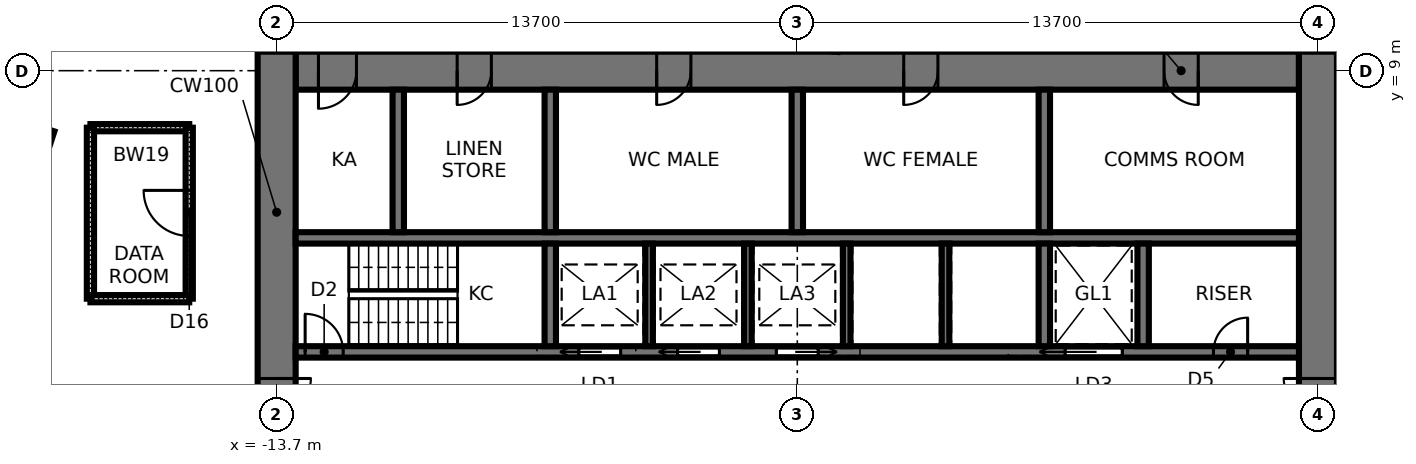
"""IFC4 building model, lengths in metres.
Left out: names, types, materials, properties, quantities, classifications, styles, units other than length and angle.
Written with IfcOpenShell. Run it as: python <this file> out.ifc"""

import sys

from ifc_helpers import new_model, si_unit, direction, frame, frame_2d, origin, origin_2d, place, context, subcontext, project, spatial, rectangle, extrude, element, fill, save


model = new_model("IFC4")
c1 = context("Model", 3, precision=1e-05, world=origin(), true_north=direction((0.0, 1.0)))
c2 = subcontext(c1, "Body", "Model", "MODEL_VIEW")
j1 = project(units=[si_unit("LENGTHUNIT", "METRE"), si_unit("PLANEANGLEUNIT", "RADIAN")], contexts=[c1])
p1 = place(None, origin())
s1 = spatial("IfcSite", under=j1, at=p1, CompositionType="ELEMENT")
p2 = place(p1, origin())
s2 = spatial("IfcBuilding", under=s1, at=p2, CompositionType="ELEMENT")
p3 = place(p2, frame((0.0, 0.0, 19.6)))
s3 = spatial("IfcBuildingStorey", under=s2, at=p3, CompositionType="ELEMENT", Elevation=19.6)
p4 = place(p3, frame((-20.808, 6.761, 0.0), z_axis=(0.0, 0.0, 1.0), x_axis=(-0.951056516295, 0.309016994375, 0.0)))
e1 = element("IfcColumn", 1, at=p4, inside=s3, PredefinedType="COLUMN", context=c2, shape_type="SweptSolid", body=[
    extrude(rectangle(XDim=2.0, YDim=2.0, at=origin_2d()), origin(), (0.0, 0.0, 1.0), 4.2),
])
p5 = place(p3, frame((13.2, 9.0, 0.0), z_axis=(0.0, 0.0, 1.0), x_axis=(-1.0, 0.0, 0.0)))
e2 = element("IfcWall", 2, at=p5, inside=s3, PredefinedType="SHEAR", context=c2, shape_type="SweptSolid", body=[
    extrude(rectangle(XDim=26.4, YDim=1.0, at=frame_2d((13.2, 0.0))), origin(), (0.0, 0.0, 1.0), 4.2),
])
p6 = place(p5, frame((2.65, 0.0, 0.0)))
e3 = element("IfcOpeningElement", 3, at=p6, cuts=e2, PredefinedType="OPENING", context=c2, shape_type="SweptSolid", body=[
    extrude(rectangle(XDim=0.9, YDim=2.1, at=frame_2d((0.45, 1.05))), frame((0.0, 0.51, 0.0), z_axis=(0.0, -1.0, 0.0), x_axis=(1.0, 0.0, 0.0)), (0.0, 0.0, 1.0), 1.02),
])
p7 = place(p5, frame((9.5, 0.0, 0.0)))
e4 = element("IfcOpeningElement", 4, at=p7, cuts=e2, PredefinedType="OPENING", context=c2, shape_type="SweptSolid", body=[
    extrude(rectangle(XDim=0.9, YDim=2.1, at=frame_2d((0.45, 1.05))), frame((0.0, 0.51, 0.0), z_axis=(0.0, -1.0, 0.0), x_axis=(1.0, 0.0, 0.0)), (0.0, 0.0, 1.0), 1.02),
])
p8 = place(p5, frame((16.0, 0.0, 0.0)))
e5 = element("IfcOpeningElement", 5, at=p8, cuts=e2, PredefinedType="OPENING", context=c2, shape_type="SweptSolid", body=[
    extrude(rectangle(XDim=0.9, YDim=2.1, at=frame_2d((0.45, 1.05))), frame((0.0, 0.51, 0.0), z_axis=(0.0, -1.0, 0.0), x_axis=(1.0, 0.0, 0.0)), (0.0, 0.0, 1.0), 1.02),
])
p9 = place(p5, frame((21.25, 0.0, 0.0)))
e6 = element("IfcOpeningElement", 6, at=p9, cuts=e2, PredefinedType="OPENING", context=c2, shape_type="SweptSolid", body=[
    extrude(rectangle(XDim=0.9, YDim=2.1, at=frame_2d((0.45, 1.05))), frame((0.0, 0.51, 0.0), z_axis=(0.0, -1.0, 0.0), x_axis=(1.0, 0.0, 0.0)), (0.0, 0.0, 1.0), 1.02),
])
p10 = place(p5, frame((24.8, 0.0, 0.0)))
e7 = element("IfcOpeningElement", 7, at=p10, cuts=e2, PredefinedType="OPENING", context=c2, shape_type="SweptSolid", body=[
    extrude(rectangle(XDim=1.0, YDim=2.1, at=frame_2d((0.5, 1.05))), frame((0.0, 0.51, 0.0), z_axis=(0.0, -1.0, 0.0), x_axis=(1.0, 0.0, 0.0)), (0.0, 0.0, 1.0), 1.02),
])
p11 = place(p3, frame((13.7, -9.5, 0.0), z_axis=(0.0, 0.0, 1.0), x_axis=(0.0, 1.0, 0.0)))
e8 = element("IfcWall", 8, at=p11, inside=s3, PredefinedType="SHEAR", context=c2, shape_type="SweptSolid", body=[
    extrude(rectangle(XDim=19.0, YDim=1.0, at=frame_2d((9.5, 0.0))), origin(), (0.0, 0.0, 1.0), 4.2),
])
p12 = place(p11, frame((8.6, 0.0, 0.0)))
e9 = element("IfcOpeningElement", 9, at=p12, cuts=e8, PredefinedType="OPENING", context=c2, shape_type="SweptSolid", body=[
    extrude(rectangle(XDim=1.8, YDim=2.4, at=frame_2d((0.9, 1.2))), frame((0.0, 0.51, 0.0), z_axis=(0.0, -1.0, 0.0), x_axis=(1.0, 0.0, 0.0)), (0.0, 0.0, 1.0), 1.02),
])
p13 = place(p3, frame((-13.7, 9.5, 0.0), z_axis=(0.0, 0.0, 1.0), x_axis=(0.0, -1.0, 0.0)))
e10 = element("IfcWall", 10, at=p13, inside=s3, PredefinedType="SHEAR", context=c2, shape_type="SweptSolid", body=[
    extrude(rectangle(XDim=19.0, YDim=1.0, at=frame_2d((9.5, 0.0))), origin(), (0.0, 0.0, 1.0), 4.2),
])
p14 = place(p13, frame((8.6, 0.0, 0.0)))
e11 = element("IfcOpeningElement", 11, at=p14, cuts=e10, PredefinedType="OPENING", context=c2, shape_type="SweptSolid", body=[
    extrude(rectangle(XDim=1.8, YDim=2.4, at=frame_2d((0.9, 1.2))), frame((0.0, 0.51, 0.0), z_axis=(0.0, -1.0, 0.0), x_axis=(1.0, 0.0, 0.0)), (0.0, 0.0, 1.0), 1.02),
])
p15 = place(p3, frame((-13.2, 1.6, 0.0), z_axis=(0.0, 0.0, 1.0), x_axis=(1.0, 0.0, 0.0)))
e12 = element("IfcWall", 12, at=p15, inside=s3, PredefinedType="SHEAR", context=c2, shape_type="SweptSolid", body=[
    extrude(rectangle(XDim=26.4, YDim=0.3, at=frame_2d((13.2, 0.0))), origin(), (0.0, 0.0, 1.0), 4.2),
])
p16 = place(p15, frame((0.25, 0.0, 0.0)))
e13 = element("IfcOpeningElement", 13, at=p16, cuts=e12, PredefinedType="OPENING", context=c2, shape_type="SweptSolid", body=[
    extrude(rectangle(XDim=1.0, YDim=2.1, at=frame_2d((0.5, 1.05))), frame((0.0, 0.16, 0.0), z_axis=(0.0, -1.0, 0.0), x_axis=(1.0, 0.0, 0.0)), (0.0, 0.0, 1.0), 0.32),
])
p17 = place(p15, frame((20.25, 0.0, 0.0)))
e14 = element("IfcOpeningElement", 14, at=p17, cuts=e12, PredefinedType="OPENING", context=c2, shape_type="SweptSolid", body=[
    extrude(rectangle(XDim=1.5, YDim=2.4, at=frame_2d((0.75, 1.2))), frame((0.0, 0.16, 0.0), z_axis=(0.0, -1.0, 0.0), x_axis=(1.0, 0.0, 0.0)), (0.0, 0.0, 1.0), 0.32),
])
p18 = place(p15, frame((7.45, 0.0, 0.0)))
e15 = element("IfcOpeningElement", 15, at=p18, cuts=e12, PredefinedType="OPENING", context=c2, shape_type="SweptSolid", body=[
    extrude(rectangle(XDim=1.1, YDim=2.3, at=frame_2d((0.55, 1.15))), frame((0.0, 0.16, 0.0), z_axis=(0.0, -1.0, 0.0), x_axis=(1.0, 0.0, 0.0)), (0.0, 0.0, 1.0), 0.32),
])
p19 = place(p15, frame((10.05, 0.0, 0.0)))
e16 = element("IfcOpeningElement", 16, at=p19, cuts=e12, PredefinedType="OPENING", context=c2, shape_type="SweptSolid", body=[
    extrude(rectangle(XDim=1.1, YDim=2.3, at=frame_2d((0.55, 1.15))), frame((0.0, 0.16, 0.0), z_axis=(0.0, -1.0, 0.0), x_axis=(1.0, 0.0, 0.0)), (0.0, 0.0, 1.0), 0.32),
])
p20 = place(p15, frame((12.65, 0.0, 0.0)))
e17 = element("IfcOpeningElement", 17, at=p20, cuts=e12, PredefinedType="OPENING", context=c2, shape_type="SweptSolid", body=[
    extrude(rectangle(XDim=1.1, YDim=2.3, at=frame_2d((0.55, 1.15))), frame((0.0, 0.16, 0.0), z_axis=(0.0, -1.0, 0.0), x_axis=(1.0, 0.0, 0.0)), (0.0, 0.0, 1.0), 0.32),
])
p21 = place(p15, frame((24.15, 0.0, 0.0)))
e18 = element("IfcOpeningElement", 18, at=p21, cuts=e12, PredefinedType="OPENING", context=c2, shape_type="SweptSolid", body=[
    extrude(rectangle(XDim=0.9, YDim=2.1, at=frame_2d((0.45, 1.05))), frame((0.0, 0.16, 0.0), z_axis=(0.0, -1.0, 0.0), x_axis=(1.0, 0.0, 0.0)), (0.0, 0.0, 1.0), 0.32),
])
p22 = place(p3, frame((-13.2, 4.6, 0.0), z_axis=(0.0, 0.0, 1.0), x_axis=(1.0, 0.0, 0.0)))
e19 = element("IfcWall", 19, at=p22, inside=s3, PredefinedType="SHEAR", context=c2, shape_type="SweptSolid", body=[
    extrude(rectangle(XDim=26.4, YDim=0.3, at=frame_2d((13.2, 0.0))), origin(), (0.0, 0.0, 1.0), 4.2),
])
p23 = place(p3, frame((-6.5, 1.75, 0.0), z_axis=(0.0, 0.0, 1.0), x_axis=(0.0, 1.0, 0.0)))
e20 = element("IfcWall", 20, at=p23, inside=s3, PredefinedType="SHEAR", context=c2, shape_type="SweptSolid", body=[
    extrude(rectangle(XDim=2.7, YDim=0.3, at=frame_2d((1.35, 0.0))), origin(), (0.0, 0.0, 1.0), 4.2),
])
p24 = place(p3, frame((-6.5, 4.75, 0.0), z_axis=(0.0, 0.0, 1.0), x_axis=(0.0, 1.0, 0.0)))
e21 = element("IfcWall", 21, at=p24, inside=s3, PredefinedType="SHEAR", context=c2, shape_type="SweptSolid", body=[
    extrude(rectangle(XDim=3.75, YDim=0.3, at=frame_2d((1.875, 0.0))), origin(), (0.0, 0.0, 1.0), 4.2),
])
p25 = place(p3, frame((6.5, 1.75, 0.0), z_axis=(0.0, 0.0, 1.0), x_axis=(0.0, 1.0, 0.0)))
e22 = element("IfcWall", 22, at=p25, inside=s3, PredefinedType="SHEAR", context=c2, shape_type="SweptSolid", body=[
    extrude(rectangle(XDim=2.7, YDim=0.3, at=frame_2d((1.35, 0.0))), origin(), (0.0, 0.0, 1.0), 4.2),
])
p26 = place(p3, frame((6.5, 4.75, 0.0), z_axis=(0.0, 0.0, 1.0), x_axis=(0.0, 1.0, 0.0)))
e23 = element("IfcWall", 23, at=p26, inside=s3, PredefinedType="SHEAR", context=c2, shape_type="SweptSolid", body=[
    extrude(rectangle(XDim=3.75, YDim=0.3, at=frame_2d((1.875, 0.0))), origin(), (0.0, 0.0, 1.0), 4.2),
])
for number, where, z_axis, x_axis in (
    (24, (-3.9, 1.75, 0.0), (0.0, 0.0, 1.0), (0.0, 1.0, 0.0)),
    (25, (-1.3, 1.75, 0.0), (0.0, 0.0, 1.0), (0.0, 1.0, 0.0)),
    (26, (1.3, 1.75, 0.0), (0.0, 0.0, 1.0), (0.0, 1.0, 0.0)),
    (27, (3.9, 1.75, 0.0), (0.0, 0.0, 1.0), (0.0, 1.0, 0.0)),
):
    element("IfcWall", number, at=place(p3, frame(where, z_axis=z_axis, x_axis=x_axis)), inside=s3, PredefinedType="SHEAR", context=c2, shape_type="SweptSolid", body=[
        extrude(rectangle(XDim=2.7, YDim=0.2, at=frame_2d((1.35, 0.0))), origin(), (0.0, 0.0, 1.0), 4.2),
    ])
for number, where, z_axis, x_axis in (
    (28, (0.0, 4.75, 0.0), (0.0, 0.0, 1.0), (0.0, 1.0, 0.0)),
    (29, (-10.5, 4.75, 0.0), (0.0, 0.0, 1.0), (0.0, 1.0, 0.0)),
):
    element("IfcWall", number, at=place(p3, frame(where, z_axis=z_axis, x_axis=x_axis)), inside=s3, PredefinedType="SHEAR", context=c2, shape_type="SweptSolid", body=[
        extrude(rectangle(XDim=3.75, YDim=0.3, at=frame_2d((1.875, 0.0))), origin(), (0.0, 0.0, 1.0), 4.2),
    ])
p27 = place(p3, frame((9.1, 1.75, 0.0), z_axis=(0.0, 0.0, 1.0), x_axis=(0.0, 1.0, 0.0)))
e30 = element("IfcWall", 30, at=p27, inside=s3, PredefinedType="SHEAR", context=c2, shape_type="SweptSolid", body=[
    extrude(rectangle(XDim=2.7, YDim=0.3, at=frame_2d((1.35, 0.0))), origin(), (0.0, 0.0, 1.0), 4.2),
])
p28 = place(p3, frame((0.999, 9.5, 0.0), z_axis=(0.0, 0.0, 1.0), x_axis=(0.104527835502, 0.994521961349, 0.0)))
e31 = element("IfcWall", 31, at=p28, inside=s3, PredefinedType="PARTITIONING", context=c2, shape_type="SweptSolid", body=[
    extrude(rectangle(XDim=13.199, YDim=0.12, at=frame_2d((6.599, 0.0))), origin(), (0.0, 0.0, 1.0), 4.04),
])
p29 = place(p3, frame((-18.6, 7.5, 0.0), z_axis=(0.0, 0.0, 1.0), x_axis=(1.0, 0.0, 0.0)))
e32 = element("IfcWall", 32, at=p29, inside=s3, PredefinedType="SOLIDWALL", context=c2, shape_type="SweptSolid", body=[
    extrude(rectangle(XDim=2.6, YDim=0.19, at=frame_2d((1.3, 0.0))), origin(), (0.0, 0.0, 1.0), 4.04),
])
p30 = place(p3, frame((-16.0, 7.5, 0.0), z_axis=(0.0, 0.0, 1.0), x_axis=(0.0, -1.0, 0.0)))
e33 = element("IfcWall", 33, at=p30, inside=s3, PredefinedType="SOLIDWALL", context=c2, shape_type="SweptSolid", body=[
    extrude(rectangle(XDim=4.5, YDim=0.19, at=frame_2d((2.25, 0.0))), origin(), (0.0, 0.0, 1.0), 4.04),
])
p31 = place(p30, frame((1.65, 0.0, 0.0)))
e34 = element("IfcOpeningElement", 34, at=p31, cuts=e33, PredefinedType="OPENING", context=c2, shape_type="SweptSolid", body=[
    extrude(rectangle(XDim=1.2, YDim=2.1, at=frame_2d((0.6, 1.05))), frame((0.0, 0.105, 0.0), z_axis=(0.0, -1.0, 0.0), x_axis=(1.0, 0.0, 0.0)), (0.0, 0.0, 1.0), 0.21),
])
p32 = place(p3, frame((-18.6, 3.0, 0.0), z_axis=(0.0, 0.0, 1.0), x_axis=(0.0, 1.0, 0.0)))
e35 = element("IfcWall", 35, at=p32, inside=s3, PredefinedType="SOLIDWALL", context=c2, shape_type="SweptSolid", body=[
    extrude(rectangle(XDim=4.5, YDim=0.19, at=frame_2d((2.25, 0.0))), origin(), (0.0, 0.0, 1.0), 3.586),
])
p33 = place(p3, frame((-16.0, 3.0, 0.0), z_axis=(0.0, 0.0, 1.0), x_axis=(-1.0, 0.0, 0.0)))
e36 = element("IfcWall", 36, at=p33, inside=s3, PredefinedType="SOLIDWALL", context=c2, shape_type="SweptSolid", body=[
    extrude(rectangle(XDim=2.6, YDim=0.19, at=frame_2d((1.3, 0.0))), origin(), (0.0, 0.0, 1.0), 4.04),
])
p34 = place(p14, origin())
e37 = element("IfcDoor", 37, at=p34, inside=s3, OperationType="DOUBLE_DOOR_SINGLE_SWING", PredefinedType="DOOR", context=c2, shape_type="SweptSolid", body=[
    extrude(rectangle(XDim=1.72, YDim=2.36, at=frame_2d((0.9, 1.18))), frame((0.0, 0.025, 0.0), z_axis=(0.0, -1.0, 0.0), x_axis=(1.0, 0.0, 0.0)), (0.0, 0.0, 1.0), 0.05),
    extrude(rectangle(XDim=0.04, YDim=2.4, at=frame_2d((0.02, 1.2))), frame((0.0, 0.25, 0.0), z_axis=(0.0, -1.0, 0.0), x_axis=(1.0, 0.0, 0.0)), (0.0, 0.0, 1.0), 0.5),
    extrude(rectangle(XDim=0.04, YDim=2.4, at=frame_2d((1.78, 1.2))), frame((0.0, 0.25, 0.0), z_axis=(0.0, -1.0, 0.0), x_axis=(1.0, 0.0, 0.0)), (0.0, 0.0, 1.0), 0.5),
    extrude(rectangle(XDim=1.72, YDim=0.04, at=frame_2d((0.9, 2.38))), frame((0.0, 0.25, 0.0), z_axis=(0.0, -1.0, 0.0), x_axis=(1.0, 0.0, 0.0)), (0.0, 0.0, 1.0), 0.5),
])
fill(e11, e37)
p35 = place(p12, origin())
e38 = element("IfcDoor", 38, at=p35, inside=s3, OperationType="DOUBLE_DOOR_SINGLE_SWING", PredefinedType="DOOR", context=c2, shape_type="SweptSolid", body=[
    extrude(rectangle(XDim=1.72, YDim=2.36, at=frame_2d((0.9, 1.18))), frame((0.0, 0.025, 0.0), z_axis=(0.0, -1.0, 0.0), x_axis=(1.0, 0.0, 0.0)), (0.0, 0.0, 1.0), 0.05),
    extrude(rectangle(XDim=0.04, YDim=2.4, at=frame_2d((0.02, 1.2))), frame((0.0, 0.25, 0.0), z_axis=(0.0, -1.0, 0.0), x_axis=(1.0, 0.0, 0.0)), (0.0, 0.0, 1.0), 0.5),
    extrude(rectangle(XDim=0.04, YDim=2.4, at=frame_2d((1.78, 1.2))), frame((0.0, 0.25, 0.0), z_axis=(0.0, -1.0, 0.0), x_axis=(1.0, 0.0, 0.0)), (0.0, 0.0, 1.0), 0.5),
    extrude(rectangle(XDim=1.72, YDim=0.04, at=frame_2d((0.9, 2.38))), frame((0.0, 0.25, 0.0), z_axis=(0.0, -1.0, 0.0), x_axis=(1.0, 0.0, 0.0)), (0.0, 0.0, 1.0), 0.5),
])
fill(e9, e38)
p36 = place(p16, origin())
e39 = element("IfcDoor", 39, at=p36, inside=s3, OperationType="SINGLE_SWING_LEFT", PredefinedType="DOOR", context=c2, shape_type="SweptSolid", body=[
    extrude(rectangle(XDim=1.0, YDim=2.1, at=frame_2d((0.5, 1.05))), frame((0.0, 0.025, 0.0), z_axis=(0.0, -1.0, 0.0), x_axis=(1.0, 0.0, 0.0)), (0.0, 0.0, 1.0), 0.05),
])
fill(e13, e39)
p37 = place(p17, origin())
e40 = element("IfcDoor", 40, at=p37, inside=s3, OperationType="SLIDING_TO_LEFT", PredefinedType="DOOR", context=c2, shape_type="SweptSolid", body=[
    extrude(rectangle(XDim=1.5, YDim=2.4, at=frame_2d((0.75, 1.2))), frame((0.0, 0.025, 0.0), z_axis=(0.0, -1.0, 0.0), x_axis=(1.0, 0.0, 0.0)), (0.0, 0.0, 1.0), 0.05),
])
fill(e14, e40)
p38 = place(p18, origin())
e41 = element("IfcDoor", 41, at=p38, inside=s3, OperationType="SLIDING_TO_LEFT", PredefinedType="DOOR", context=c2, shape_type="SweptSolid", body=[
    extrude(rectangle(XDim=1.1, YDim=2.3, at=frame_2d((0.55, 1.15))), frame((0.0, 0.025, 0.0), z_axis=(0.0, -1.0, 0.0), x_axis=(1.0, 0.0, 0.0)), (0.0, 0.0, 1.0), 0.05),
])
fill(e15, e41)
p39 = place(p19, origin())
e42 = element("IfcDoor", 42, at=p39, inside=s3, OperationType="SLIDING_TO_LEFT", PredefinedType="DOOR", context=c2, shape_type="SweptSolid", body=[
    extrude(rectangle(XDim=1.1, YDim=2.3, at=frame_2d((0.55, 1.15))), frame((0.0, 0.025, 0.0), z_axis=(0.0, -1.0, 0.0), x_axis=(1.0, 0.0, 0.0)), (0.0, 0.0, 1.0), 0.05),
])
fill(e16, e42)
p40 = place(p20, origin())
e43 = element("IfcDoor", 43, at=p40, inside=s3, OperationType="SLIDING_TO_RIGHT", PredefinedType="DOOR", context=c2, shape_type="SweptSolid", body=[
    extrude(rectangle(XDim=1.1, YDim=2.3, at=frame_2d((0.55, 1.15))), frame((0.0, 0.025, 0.0), z_axis=(0.0, -1.0, 0.0), x_axis=(1.0, 0.0, 0.0)), (0.0, 0.0, 1.0), 0.05),
])
fill(e17, e43)
p41 = place(p21, origin())
e44 = element("IfcDoor", 44, at=p41, inside=s3, OperationType="SINGLE_SWING_RIGHT", PredefinedType="DOOR", context=c2, shape_type="SweptSolid", body=[
    extrude(rectangle(XDim=0.9, YDim=2.1, at=frame_2d((0.45, 1.05))), frame((0.0, 0.025, 0.0), z_axis=(0.0, -1.0, 0.0), x_axis=(1.0, 0.0, 0.0)), (0.0, 0.0, 1.0), 0.05),
])
fill(e18, e44)
p42 = place(p6, origin())
e45 = element("IfcDoor", 45, at=p42, inside=s3, OperationType="SINGLE_SWING_LEFT", PredefinedType="DOOR", context=c2, shape_type="SweptSolid", body=[
    extrude(rectangle(XDim=0.82, YDim=2.06, at=frame_2d((0.45, 1.03))), frame((0.0, 0.025, 0.0), z_axis=(0.0, -1.0, 0.0), x_axis=(1.0, 0.0, 0.0)), (0.0, 0.0, 1.0), 0.05),
    extrude(rectangle(XDim=0.04, YDim=2.1, at=frame_2d((0.02, 1.05))), frame((0.0, 0.25, 0.0), z_axis=(0.0, -1.0, 0.0), x_axis=(1.0, 0.0, 0.0)), (0.0, 0.0, 1.0), 0.5),
    extrude(rectangle(XDim=0.04, YDim=2.1, at=frame_2d((0.88, 1.05))), frame((0.0, 0.25, 0.0), z_axis=(0.0, -1.0, 0.0), x_axis=(1.0, 0.0, 0.0)), (0.0, 0.0, 1.0), 0.5),
    extrude(rectangle(XDim=0.82, YDim=0.04, at=frame_2d((0.45, 2.08))), frame((0.0, 0.25, 0.0), z_axis=(0.0, -1.0, 0.0), x_axis=(1.0, 0.0, 0.0)), (0.0, 0.0, 1.0), 0.5),
])
fill(e3, e45)
p43 = place(p7, origin())
e46 = element("IfcDoor", 46, at=p43, inside=s3, OperationType="SINGLE_SWING_RIGHT", PredefinedType="DOOR", context=c2, shape_type="SweptSolid", body=[
    extrude(rectangle(XDim=0.82, YDim=2.06, at=frame_2d((0.45, 1.03))), frame((0.0, 0.025, 0.0), z_axis=(0.0, -1.0, 0.0), x_axis=(1.0, 0.0, 0.0)), (0.0, 0.0, 1.0), 0.05),
    extrude(rectangle(XDim=0.04, YDim=2.1, at=frame_2d((0.02, 1.05))), frame((0.0, 0.25, 0.0), z_axis=(0.0, -1.0, 0.0), x_axis=(1.0, 0.0, 0.0)), (0.0, 0.0, 1.0), 0.5),
    extrude(rectangle(XDim=0.04, YDim=2.1, at=frame_2d((0.88, 1.05))), frame((0.0, 0.25, 0.0), z_axis=(0.0, -1.0, 0.0), x_axis=(1.0, 0.0, 0.0)), (0.0, 0.0, 1.0), 0.5),
    extrude(rectangle(XDim=0.82, YDim=0.04, at=frame_2d((0.45, 2.08))), frame((0.0, 0.25, 0.0), z_axis=(0.0, -1.0, 0.0), x_axis=(1.0, 0.0, 0.0)), (0.0, 0.0, 1.0), 0.5),
])
fill(e4, e46)
p44 = place(p8, origin())
e47 = element("IfcDoor", 47, at=p44, inside=s3, OperationType="SINGLE_SWING_RIGHT", PredefinedType="DOOR", context=c2, shape_type="SweptSolid", body=[
    extrude(rectangle(XDim=0.82, YDim=2.06, at=frame_2d((0.45, 1.03))), frame((0.0, 0.025, 0.0), z_axis=(0.0, -1.0, 0.0), x_axis=(1.0, 0.0, 0.0)), (0.0, 0.0, 1.0), 0.05),
    extrude(rectangle(XDim=0.04, YDim=2.1, at=frame_2d((0.02, 1.05))), frame((0.0, 0.25, 0.0), z_axis=(0.0, -1.0, 0.0), x_axis=(1.0, 0.0, 0.0)), (0.0, 0.0, 1.0), 0.5),
    extrude(rectangle(XDim=0.04, YDim=2.1, at=frame_2d((0.88, 1.05))), frame((0.0, 0.25, 0.0), z_axis=(0.0, -1.0, 0.0), x_axis=(1.0, 0.0, 0.0)), (0.0, 0.0, 1.0), 0.5),
    extrude(rectangle(XDim=0.82, YDim=0.04, at=frame_2d((0.45, 2.08))), frame((0.0, 0.25, 0.0), z_axis=(0.0, -1.0, 0.0), x_axis=(1.0, 0.0, 0.0)), (0.0, 0.0, 1.0), 0.5),
])
fill(e5, e47)
p45 = place(p9, origin())
e48 = element("IfcDoor", 48, at=p45, inside=s3, OperationType="SINGLE_SWING_RIGHT", PredefinedType="DOOR", context=c2, shape_type="SweptSolid", body=[
    extrude(rectangle(XDim=0.82, YDim=2.06, at=frame_2d((0.45, 1.03))), frame((0.0, 0.025, 0.0), z_axis=(0.0, -1.0, 0.0), x_axis=(1.0, 0.0, 0.0)), (0.0, 0.0, 1.0), 0.05),
    extrude(rectangle(XDim=0.04, YDim=2.1, at=frame_2d((0.02, 1.05))), frame((0.0, 0.25, 0.0), z_axis=(0.0, -1.0, 0.0), x_axis=(1.0, 0.0, 0.0)), (0.0, 0.0, 1.0), 0.5),
    extrude(rectangle(XDim=0.04, YDim=2.1, at=frame_2d((0.88, 1.05))), frame((0.0, 0.25, 0.0), z_axis=(0.0, -1.0, 0.0), x_axis=(1.0, 0.0, 0.0)), (0.0, 0.0, 1.0), 0.5),
    extrude(rectangle(XDim=0.82, YDim=0.04, at=frame_2d((0.45, 2.08))), frame((0.0, 0.25, 0.0), z_axis=(0.0, -1.0, 0.0), x_axis=(1.0, 0.0, 0.0)), (0.0, 0.0, 1.0), 0.5),
])
fill(e6, e48)
p46 = place(p10, origin())
e49 = element("IfcDoor", 49, at=p46, inside=s3, OperationType="SINGLE_SWING_RIGHT", PredefinedType="DOOR", context=c2, shape_type="SweptSolid", body=[
    extrude(rectangle(XDim=0.92, YDim=2.06, at=frame_2d((0.5, 1.03))), frame((0.0, 0.025, 0.0), z_axis=(0.0, -1.0, 0.0), x_axis=(1.0, 0.0, 0.0)), (0.0, 0.0, 1.0), 0.05),
    extrude(rectangle(XDim=0.04, YDim=2.1, at=frame_2d((0.02, 1.05))), frame((0.0, 0.25, 0.0), z_axis=(0.0, -1.0, 0.0), x_axis=(1.0, 0.0, 0.0)), (0.0, 0.0, 1.0), 0.5),
    extrude(rectangle(XDim=0.04, YDim=2.1, at=frame_2d((0.98, 1.05))), frame((0.0, 0.25, 0.0), z_axis=(0.0, -1.0, 0.0), x_axis=(1.0, 0.0, 0.0)), (0.0, 0.0, 1.0), 0.5),
    extrude(rectangle(XDim=0.92, YDim=0.04, at=frame_2d((0.5, 2.08))), frame((0.0, 0.25, 0.0), z_axis=(0.0, -1.0, 0.0), x_axis=(1.0, 0.0, 0.0)), (0.0, 0.0, 1.0), 0.5),
])
fill(e7, e49)
p47 = place(p31, frame((1.2, 0.0, 0.0), z_axis=(0.0, 0.0, 1.0), x_axis=(-1.0, 0.0, 0.0)))
e50 = element("IfcDoor", 50, at=p47, inside=s3, OperationType="SINGLE_SWING_RIGHT", PredefinedType="DOOR", context=c2, shape_type="SweptSolid", body=[
    extrude(rectangle(XDim=1.2, YDim=2.1, at=frame_2d((0.6, 1.05))), frame((0.0, 0.025, 0.0), z_axis=(0.0, -1.0, 0.0), x_axis=(1.0, 0.0, 0.0)), (0.0, 0.0, 1.0), 0.05),
])
fill(e34, e50)
save(model, sys.argv[1])
